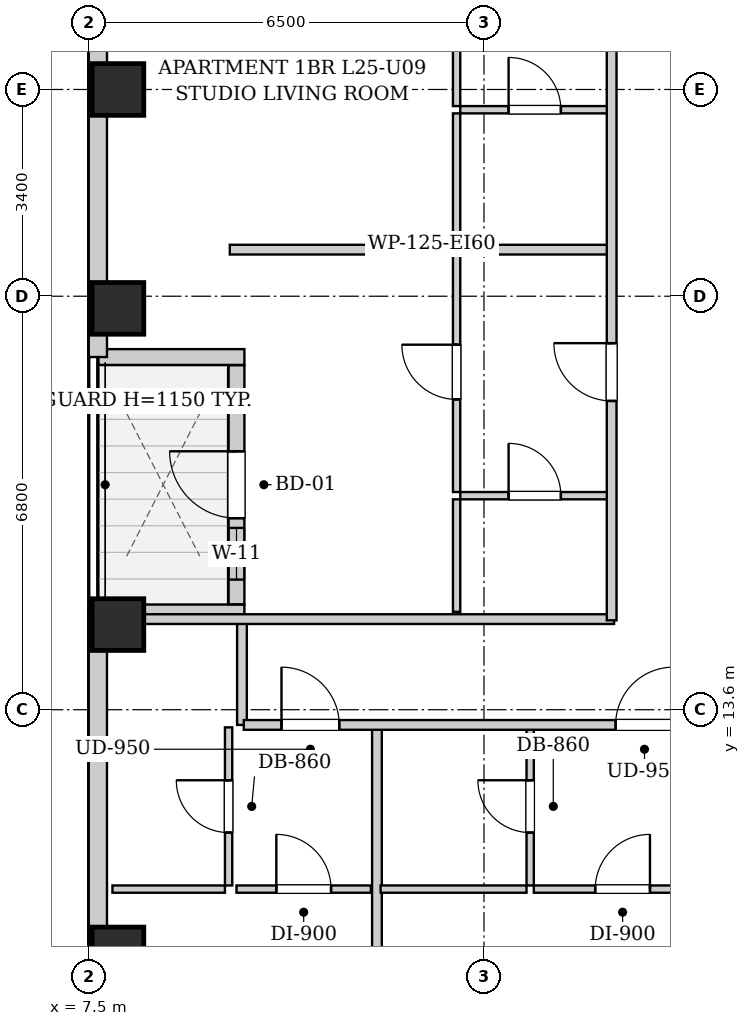
"""IFC4 building model, lengths in metres.
Left out: names, types, materials, properties, quantities, classifications, styles, units other than length and angle.
Written with IfcOpenShell. Run it as: python <this file> out.ifc"""

import sys

from ifc_helpers import new_model, si_unit, direction, frame, frame_2d, origin, origin_2d, place, context, subcontext, project, spatial, rectangle, extrude, element, fill, save


model = new_model("IFC4")
c1 = context("Model", 3, precision=1e-05, world=origin(), true_north=direction((0.0, 1.0)))
c2 = subcontext(c1, "Body", "Model", "MODEL_VIEW")
j1 = project(units=[si_unit("LENGTHUNIT", "METRE"), si_unit("PLANEANGLEUNIT", "RADIAN")], contexts=[c1])
p1 = place(None, origin())
s1 = spatial("IfcSite", under=j1, at=p1, CompositionType="ELEMENT")
p2 = place(p1, origin())
s2 = spatial("IfcBuilding", under=s1, at=p2, CompositionType="ELEMENT")
p3 = place(p2, frame((0.0, 0.0, 91.1)))
s3 = spatial("IfcBuildingStorey", under=s2, at=p3, CompositionType="ELEMENT", Elevation=91.1)
for number, where, z_axis, x_axis in (
    (1, (7.98, 9.6, 0.0), (0.0, 0.0, 1.0), (1.0, 0.0, 0.0)),
    (2, (7.98, 15.0, 0.0), (0.0, 0.0, 1.0), (1.0, 0.0, 0.0)),
    (3, (7.98, 20.2, 0.0), (0.0, 0.0, 1.0), (1.0, 0.0, 0.0)),
    (4, (7.98, 23.8, 0.0), (0.0, 0.0, 1.0), (1.0, 0.0, 0.0)),
):
    element("IfcColumn", number, at=place(p3, frame(where, z_axis=z_axis, x_axis=x_axis)), inside=s3, PredefinedType="COLUMN", context=c2, shape_type="SweptSolid", body=[
        extrude(rectangle(XDim=0.85, YDim=0.85, at=origin_2d()), origin(), (0.0, 0.0, 1.0), 3.2),
    ])
p4 = place(p3, frame((7.65, 2.5, 0.0), z_axis=(0.0, 0.0, 1.0), x_axis=(0.0, 1.0, 0.0)))
e5 = element("IfcWall", 5, at=p4, inside=s3, PredefinedType="SOLIDWALL", context=c2, shape_type="SweptSolid", body=[
    extrude(rectangle(XDim=12.7, YDim=0.3, at=frame_2d((6.35, 0.0))), origin(), (0.0, 0.0, 1.0), 2.94),
])
p5 = place(p4, frame((3.482, 0.0, 0.55)))
e6 = element("IfcOpeningElement", 6, at=p5, cuts=e5, PredefinedType="OPENING", context=c2, shape_type="SweptSolid", body=[
    extrude(rectangle(XDim=1.35, YDim=1.2, at=frame_2d((0.675, 0.6))), frame((0.0, 0.16, 0.0), z_axis=(0.0, -1.0, 0.0), x_axis=(1.0, 0.0, 0.0)), (0.0, 0.0, 1.0), 0.32),
])
p6 = place(p4, frame((1.135, 0.0, 0.55)))
e7 = element("IfcOpeningElement", 7, at=p6, cuts=e5, PredefinedType="OPENING", context=c2, shape_type="SweptSolid", body=[
    extrude(rectangle(XDim=1.35, YDim=1.2, at=frame_2d((0.675, 0.6))), frame((0.0, 0.16, 0.0), z_axis=(0.0, -1.0, 0.0), x_axis=(1.0, 0.0, 0.0)), (0.0, 0.0, 1.0), 0.32),
])
p7 = place(p3, frame((7.66, 15.2, 0.0), z_axis=(0.0, 0.0, 1.0), x_axis=(1.0, 0.0, 0.0)))
e8 = element("IfcWall", 8, at=p7, inside=s3, PredefinedType="SOLIDWALL", context=c2, shape_type="SweptSolid", body=[
    extrude(rectangle(XDim=2.4, YDim=0.26, at=frame_2d((1.2, 0.0))), origin(), (0.0, 0.0, 1.0), 2.94),
])
p8 = place(p3, frame((9.93, 15.334, 0.0), z_axis=(0.0, 0.0, 1.0), x_axis=(0.0, 1.0, 0.0)))
e9 = element("IfcWall", 9, at=p8, inside=s3, PredefinedType="SOLIDWALL", context=c2, shape_type="SweptSolid", body=[
    extrude(rectangle(XDim=3.932, YDim=0.26, at=frame_2d((1.966, 0.0))), origin(), (0.0, 0.0, 1.0), 2.94),
])
p9 = place(p8, frame((1.416, 0.0, 0.0)))
e10 = element("IfcOpeningElement", 10, at=p9, cuts=e9, PredefinedType="OPENING", context=c2, shape_type="SweptSolid", body=[
    extrude(rectangle(XDim=1.1, YDim=2.0, at=frame_2d((0.55, 1.0))), frame((0.0, 0.14, 0.0), z_axis=(0.0, -1.0, 0.0), x_axis=(1.0, 0.0, 0.0)), (0.0, 0.0, 1.0), 0.28),
])
p10 = place(p8, frame((0.406, 0.0, 0.55)))
e11 = element("IfcOpeningElement", 11, at=p10, cuts=e9, PredefinedType="OPENING", context=c2, shape_type="SweptSolid", body=[
    extrude(rectangle(XDim=0.85, YDim=1.2, at=frame_2d((0.425, 0.6))), frame((0.0, 0.14, 0.0), z_axis=(0.0, -1.0, 0.0), x_axis=(1.0, 0.0, 0.0)), (0.0, 0.0, 1.0), 0.28),
])
p11 = place(p3, frame((10.06, 19.4, 0.0), z_axis=(0.0, 0.0, 1.0), x_axis=(-1.0, 0.0, 0.0)))
e12 = element("IfcWall", 12, at=p11, inside=s3, PredefinedType="SOLIDWALL", context=c2, shape_type="SweptSolid", body=[
    extrude(rectangle(XDim=2.4, YDim=0.26, at=frame_2d((1.2, 0.0))), origin(), (0.0, 0.0, 1.0), 2.94),
])
p12 = place(p3, frame((7.65, 19.4, 0.0), z_axis=(0.0, 0.0, 1.0), x_axis=(0.0, 1.0, 0.0)))
e13 = element("IfcWall", 13, at=p12, inside=s3, PredefinedType="SOLIDWALL", context=c2, shape_type="SweptSolid", body=[
    extrude(rectangle(XDim=21.4, YDim=0.3, at=frame_2d((10.7, 0.0))), origin(), (0.0, 0.0, 1.0), 2.94),
])
p13 = place(p12, frame((16.957, 0.0, 0.55)))
e14 = element("IfcOpeningElement", 14, at=p13, cuts=e13, PredefinedType="OPENING", context=c2, shape_type="SweptSolid", body=[
    extrude(rectangle(XDim=1.35, YDim=1.2, at=frame_2d((0.675, 0.6))), frame((0.0, 0.16, 0.0), z_axis=(0.0, -1.0, 0.0), x_axis=(1.0, 0.0, 0.0)), (0.0, 0.0, 1.0), 0.32),
])
p14 = place(p12, frame((15.185, 0.0, 0.55)))
e15 = element("IfcOpeningElement", 15, at=p14, cuts=e13, PredefinedType="OPENING", context=c2, shape_type="SweptSolid", body=[
    extrude(rectangle(XDim=1.35, YDim=1.2, at=frame_2d((0.675, 0.6))), frame((0.0, 0.16, 0.0), z_axis=(0.0, -1.0, 0.0), x_axis=(1.0, 0.0, 0.0)), (0.0, 0.0, 1.0), 0.32),
])
p15 = place(p12, frame((5.1, 0.0, 0.55)))
e16 = element("IfcOpeningElement", 16, at=p15, cuts=e13, PredefinedType="OPENING", context=c2, shape_type="SweptSolid", body=[
    extrude(rectangle(XDim=1.35, YDim=1.2, at=frame_2d((0.675, 0.6))), frame((0.0, 0.16, 0.0), z_axis=(0.0, -1.0, 0.0), x_axis=(1.0, 0.0, 0.0)), (0.0, 0.0, 1.0), 0.32),
])
p16 = place(p12, frame((6.71, 0.0, 0.55)))
e17 = element("IfcOpeningElement", 17, at=p16, cuts=e13, PredefinedType="OPENING", context=c2, shape_type="SweptSolid", body=[
    extrude(rectangle(XDim=1.35, YDim=1.2, at=frame_2d((0.675, 0.6))), frame((0.0, 0.16, 0.0), z_axis=(0.0, -1.0, 0.0), x_axis=(1.0, 0.0, 0.0)), (0.0, 0.0, 1.0), 0.32),
])
p17 = place(p3, frame((10.02, 13.35, 0.0), z_axis=(0.0, 0.0, 1.0), x_axis=(0.0, 1.0, 0.0)))
e18 = element("IfcWall", 18, at=p17, inside=s3, PredefinedType="PARTITIONING", context=c2, shape_type="SweptSolid", body=[
    extrude(rectangle(XDim=1.74, YDim=0.16, at=frame_2d((0.87, 0.0))), origin(), (0.0, 0.0, 1.0), 2.94),
])
p18 = place(p3, frame((7.78, 15.09, 0.0), z_axis=(0.0, 0.0, 1.0), x_axis=(1.0, 0.0, 0.0)))
e19 = element("IfcWall", 19, at=p18, inside=s3, PredefinedType="PARTITIONING", context=c2, shape_type="SweptSolid", body=[
    extrude(rectangle(XDim=8.36, YDim=0.16, at=frame_2d((4.18, 0.0))), origin(), (0.0, 0.0, 1.0), 2.309),
])
p19 = place(p3, frame((9.8, 10.71, 0.0), z_axis=(0.0, 0.0, 1.0), x_axis=(0.0, 1.0, 0.0)))
e20 = element("IfcWall", 20, at=p19, inside=s3, PredefinedType="PARTITIONING", context=c2, shape_type="SweptSolid", body=[
    extrude(rectangle(XDim=2.6, YDim=0.12, at=frame_2d((1.3, 0.0))), origin(), (0.0, 0.0, 1.0), 2.94),
])
p20 = place(p19, frame((0.87, 0.0, 0.0)))
e21 = element("IfcOpeningElement", 21, at=p20, cuts=e20, PredefinedType="OPENING", context=c2, shape_type="SweptSolid", body=[
    extrude(rectangle(XDim=0.86, YDim=2.05, at=frame_2d((0.43, 1.025))), frame((0.0, 0.07, 0.0), z_axis=(0.0, -1.0, 0.0), x_axis=(1.0, 0.0, 0.0)), (0.0, 0.0, 1.0), 0.14),
])
p21 = place(p3, frame((7.89, 10.65, 0.0), z_axis=(0.0, 0.0, 1.0), x_axis=(1.0, 0.0, 0.0)))
e22 = element("IfcWall", 22, at=p21, inside=s3, PredefinedType="PARTITIONING", context=c2, shape_type="SweptSolid", body=[
    extrude(rectangle(XDim=1.85, YDim=0.12, at=frame_2d((0.925, 0.0))), origin(), (0.0, 0.0, 1.0), 2.94),
])
p22 = place(p3, frame((9.93, 10.65, 0.0), z_axis=(0.0, 0.0, 1.0), x_axis=(1.0, 0.0, 0.0)))
e23 = element("IfcWall", 23, at=p22, inside=s3, PredefinedType="PARTITIONING", context=c2, shape_type="SweptSolid", body=[
    extrude(rectangle(XDim=2.21, YDim=0.12, at=frame_2d((1.105, 0.0))), origin(), (0.0, 0.0, 1.0), 2.94),
])
p23 = place(p22, frame((0.655, 0.0, 0.0)))
e24 = element("IfcOpeningElement", 24, at=p23, cuts=e23, PredefinedType="OPENING", context=c2, shape_type="SweptSolid", body=[
    extrude(rectangle(XDim=0.9, YDim=2.05, at=frame_2d((0.45, 1.025))), frame((0.0, 0.07, 0.0), z_axis=(0.0, -1.0, 0.0), x_axis=(1.0, 0.0, 0.0)), (0.0, 0.0, 1.0), 0.14),
])
p24 = place(p3, frame((12.24, 2.26, 0.0), z_axis=(0.0, 0.0, 1.0), x_axis=(0.0, 1.0, 0.0)))
e25 = element("IfcWall", 25, at=p24, inside=s3, PredefinedType="PARTITIONING", context=c2, shape_type="SweptSolid", body=[
    extrude(rectangle(XDim=11.05, YDim=0.16, at=frame_2d((5.525, 0.0))), origin(), (0.0, 0.0, 1.0), 2.94),
])
p25 = place(p3, frame((14.76, 10.71, 0.0), z_axis=(0.0, 0.0, 1.0), x_axis=(0.0, 1.0, 0.0)))
e26 = element("IfcWall", 26, at=p25, inside=s3, PredefinedType="PARTITIONING", context=c2, shape_type="SweptSolid", body=[
    extrude(rectangle(XDim=2.6, YDim=0.12, at=frame_2d((1.3, 0.0))), origin(), (0.0, 0.0, 1.0), 2.94),
])
p26 = place(p25, frame((0.87, 0.0, 0.0)))
e27 = element("IfcOpeningElement", 27, at=p26, cuts=e26, PredefinedType="OPENING", context=c2, shape_type="SweptSolid", body=[
    extrude(rectangle(XDim=0.86, YDim=2.05, at=frame_2d((0.43, 1.025))), frame((0.0, 0.07, 0.0), z_axis=(0.0, -1.0, 0.0), x_axis=(1.0, 0.0, 0.0)), (0.0, 0.0, 1.0), 0.14),
])
p27 = place(p3, frame((12.3, 10.65, 0.0), z_axis=(0.0, 0.0, 1.0), x_axis=(1.0, 0.0, 0.0)))
e28 = element("IfcWall", 28, at=p27, inside=s3, PredefinedType="PARTITIONING", context=c2, shape_type="SweptSolid", body=[
    extrude(rectangle(XDim=2.4, YDim=0.12, at=frame_2d((1.2, 0.0))), origin(), (0.0, 0.0, 1.0), 2.94),
])
p28 = place(p3, frame((14.82, 10.65, 0.0), z_axis=(0.0, 0.0, 1.0), x_axis=(1.0, 0.0, 0.0)))
e29 = element("IfcWall", 29, at=p28, inside=s3, PredefinedType="PARTITIONING", context=c2, shape_type="SweptSolid", body=[
    extrude(rectangle(XDim=2.92, YDim=0.12, at=frame_2d((1.46, 0.0))), origin(), (0.0, 0.0, 1.0), 2.94),
])
p29 = place(p28, frame((1.01, 0.0, 0.0)))
e30 = element("IfcOpeningElement", 30, at=p29, cuts=e29, PredefinedType="OPENING", context=c2, shape_type="SweptSolid", body=[
    extrude(rectangle(XDim=0.9, YDim=2.05, at=frame_2d((0.45, 1.025))), frame((0.0, 0.07, 0.0), z_axis=(0.0, -1.0, 0.0), x_axis=(1.0, 0.0, 0.0)), (0.0, 0.0, 1.0), 0.14),
])
p30 = place(p3, frame((9.82, 21.166, 0.0), z_axis=(0.0, 0.0, 1.0), x_axis=(1.0, 0.0, 0.0)))
e31 = element("IfcWall", 31, at=p30, inside=s3, PredefinedType="PARTITIONING", context=c2, shape_type="SweptSolid", body=[
    extrude(rectangle(XDim=6.24, YDim=0.16, at=frame_2d((3.12, 0.0))), origin(), (0.0, 0.0, 1.0), 2.94),
])
p31 = place(p3, frame((13.61, 17.12, 0.0), z_axis=(0.0, 0.0, 1.0), x_axis=(1.0, 0.0, 0.0)))
e32 = element("IfcWall", 32, at=p31, inside=s3, PredefinedType="PARTITIONING", context=c2, shape_type="SweptSolid", body=[
    extrude(rectangle(XDim=2.45, YDim=0.12, at=frame_2d((1.225, 0.0))), origin(), (0.0, 0.0, 1.0), 2.94),
])
p32 = place(p31, frame((0.795, 0.0, 0.0)))
e33 = element("IfcOpeningElement", 33, at=p32, cuts=e32, PredefinedType="OPENING", context=c2, shape_type="SweptSolid", body=[
    extrude(rectangle(XDim=0.86, YDim=2.05, at=frame_2d((0.43, 1.025))), frame((0.0, 0.07, 0.0), z_axis=(0.0, -1.0, 0.0), x_axis=(1.0, 0.0, 0.0)), (0.0, 0.0, 1.0), 0.14),
])
p33 = place(p3, frame((13.55, 15.21, 0.0), z_axis=(0.0, 0.0, 1.0), x_axis=(0.0, 1.0, 0.0)))
e34 = element("IfcWall", 34, at=p33, inside=s3, PredefinedType="PARTITIONING", context=c2, shape_type="SweptSolid", body=[
    extrude(rectangle(XDim=1.85, YDim=0.12, at=frame_2d((0.925, 0.0))), origin(), (0.0, 0.0, 1.0), 2.94),
])
p34 = place(p3, frame((13.55, 17.18, 0.0), z_axis=(0.0, 0.0, 1.0), x_axis=(0.0, 1.0, 0.0)))
e35 = element("IfcWall", 35, at=p34, inside=s3, PredefinedType="PARTITIONING", context=c2, shape_type="SweptSolid", body=[
    extrude(rectangle(XDim=3.946, YDim=0.12, at=frame_2d((1.973, 0.0))), origin(), (0.0, 0.0, 1.0), 2.94),
])
p35 = place(p34, frame((1.523, 0.0, 0.0)))
e36 = element("IfcOpeningElement", 36, at=p35, cuts=e35, PredefinedType="OPENING", context=c2, shape_type="SweptSolid", body=[
    extrude(rectangle(XDim=0.9, YDim=2.05, at=frame_2d((0.45, 1.025))), frame((0.0, 0.07, 0.0), z_axis=(0.0, -1.0, 0.0), x_axis=(1.0, 0.0, 0.0)), (0.0, 0.0, 1.0), 0.14),
])
p36 = place(p3, frame((13.61, 23.467, 0.0), z_axis=(0.0, 0.0, 1.0), x_axis=(1.0, 0.0, 0.0)))
e37 = element("IfcWall", 37, at=p36, inside=s3, PredefinedType="PARTITIONING", context=c2, shape_type="SweptSolid", body=[
    extrude(rectangle(XDim=2.45, YDim=0.12, at=frame_2d((1.225, 0.0))), origin(), (0.0, 0.0, 1.0), 2.94),
])
p37 = place(p36, frame((0.795, 0.0, 0.0)))
e38 = element("IfcOpeningElement", 38, at=p37, cuts=e37, PredefinedType="OPENING", context=c2, shape_type="SweptSolid", body=[
    extrude(rectangle(XDim=0.86, YDim=2.05, at=frame_2d((0.43, 1.025))), frame((0.0, 0.07, 0.0), z_axis=(0.0, -1.0, 0.0), x_axis=(1.0, 0.0, 0.0)), (0.0, 0.0, 1.0), 0.14),
])
p38 = place(p3, frame((13.55, 21.286, 0.0), z_axis=(0.0, 0.0, 1.0), x_axis=(0.0, 1.0, 0.0)))
e39 = element("IfcWall", 39, at=p38, inside=s3, PredefinedType="PARTITIONING", context=c2, shape_type="SweptSolid", body=[
    extrude(rectangle(XDim=2.121, YDim=0.12, at=frame_2d((1.061, 0.0))), origin(), (0.0, 0.0, 1.0), 2.94),
])
p39 = place(p3, frame((13.55, 23.527, 0.0), z_axis=(0.0, 0.0, 1.0), x_axis=(0.0, 1.0, 0.0)))
e40 = element("IfcWall", 40, at=p39, inside=s3, PredefinedType="PARTITIONING", context=c2, shape_type="SweptSolid", body=[
    extrude(rectangle(XDim=5.333, YDim=0.12, at=frame_2d((2.667, 0.0))), origin(), (0.0, 0.0, 1.0), 2.94),
])
p40 = place(p39, frame((2.216, 0.0, 0.0)))
e41 = element("IfcOpeningElement", 41, at=p40, cuts=e40, PredefinedType="OPENING", context=c2, shape_type="SweptSolid", body=[
    extrude(rectangle(XDim=0.9, YDim=2.05, at=frame_2d((0.45, 1.025))), frame((0.0, 0.07, 0.0), z_axis=(0.0, -1.0, 0.0), x_axis=(1.0, 0.0, 0.0)), (0.0, 0.0, 1.0), 0.14),
])
p41 = place(p3, frame((10.05, 13.35, 0.0), z_axis=(0.0, 0.0, 1.0), x_axis=(1.0, 0.0, 0.0)))
e42 = element("IfcWall", 42, at=p41, inside=s3, PredefinedType="PARTITIONING", context=c2, shape_type="SweptSolid", body=[
    extrude(rectangle(XDim=30.8, YDim=0.16, at=frame_2d((15.4, 0.0))), origin(), (0.0, 0.0, 1.0), 2.94),
])
p42 = place(p41, frame((0.62, 0.0, 0.0)))
e43 = element("IfcOpeningElement", 43, at=p42, cuts=e42, PredefinedType="OPENING", context=c2, shape_type="SweptSolid", body=[
    extrude(rectangle(XDim=0.95, YDim=2.1, at=frame_2d((0.475, 1.05))), frame((0.0, 0.09, 0.0), z_axis=(0.0, -1.0, 0.0), x_axis=(1.0, 0.0, 0.0)), (0.0, 0.0, 1.0), 0.18),
])
p43 = place(p41, frame((6.115, 0.0, 0.0)))
e44 = element("IfcOpeningElement", 44, at=p43, cuts=e42, PredefinedType="OPENING", context=c2, shape_type="SweptSolid", body=[
    extrude(rectangle(XDim=0.95, YDim=2.1, at=frame_2d((0.475, 1.05))), frame((0.0, 0.09, 0.0), z_axis=(0.0, -1.0, 0.0), x_axis=(1.0, 0.0, 0.0)), (0.0, 0.0, 1.0), 0.18),
])
p44 = place(p41, frame((17.056, 0.0, 0.0)))
e45 = element("IfcOpeningElement", 45, at=p44, cuts=e42, PredefinedType="OPENING", context=c2, shape_type="SweptSolid", body=[
    extrude(rectangle(XDim=0.95, YDim=2.1, at=frame_2d((0.475, 1.05))), frame((0.0, 0.09, 0.0), z_axis=(0.0, -1.0, 0.0), x_axis=(1.0, 0.0, 0.0)), (0.0, 0.0, 1.0), 0.18),
])
p45 = place(p41, frame((24.025, 0.0, 0.0)))
e46 = element("IfcOpeningElement", 46, at=p45, cuts=e42, PredefinedType="OPENING", context=c2, shape_type="SweptSolid", body=[
    extrude(rectangle(XDim=0.95, YDim=2.1, at=frame_2d((0.475, 1.05))), frame((0.0, 0.09, 0.0), z_axis=(0.0, -1.0, 0.0), x_axis=(1.0, 0.0, 0.0)), (0.0, 0.0, 1.0), 0.18),
])
p46 = place(p3, frame((16.1, 15.07, 0.0), z_axis=(0.0, 0.0, 1.0), x_axis=(0.0, 1.0, 0.0)))
e47 = element("IfcWall", 47, at=p46, inside=s3, PredefinedType="PARTITIONING", context=c2, shape_type="SweptSolid", body=[
    extrude(rectangle(XDim=13.93, YDim=0.16, at=frame_2d((6.965, 0.0))), origin(), (0.0, 0.0, 1.0), 2.94),
])
p47 = place(p46, frame((3.608, 0.0, 0.0)))
e48 = element("IfcOpeningElement", 48, at=p47, cuts=e47, PredefinedType="OPENING", context=c2, shape_type="SweptSolid", body=[
    extrude(rectangle(XDim=0.95, YDim=2.1, at=frame_2d((0.475, 1.05))), frame((0.0, 0.09, 0.0), z_axis=(0.0, -1.0, 0.0), x_axis=(1.0, 0.0, 0.0)), (0.0, 0.0, 1.0), 0.18),
])
p48 = place(p46, frame((10.649, 0.0, 0.0)))
e49 = element("IfcOpeningElement", 49, at=p48, cuts=e47, PredefinedType="OPENING", context=c2, shape_type="SweptSolid", body=[
    extrude(rectangle(XDim=0.95, YDim=2.1, at=frame_2d((0.475, 1.05))), frame((0.0, 0.09, 0.0), z_axis=(0.0, -1.0, 0.0), x_axis=(1.0, 0.0, 0.0)), (0.0, 0.0, 1.0), 0.18),
])
p49 = place(p20, origin())
e50 = element("IfcDoor", 50, at=p49, inside=s3, OperationType="SINGLE_SWING_RIGHT", PredefinedType="DOOR", context=c2, shape_type="SweptSolid", body=[
    extrude(rectangle(XDim=0.86, YDim=2.05, at=frame_2d((0.43, 1.025))), frame((0.0, 0.025, 0.0), z_axis=(0.0, -1.0, 0.0), x_axis=(1.0, 0.0, 0.0)), (0.0, 0.0, 1.0), 0.05),
])
fill(e21, e50)
p50 = place(p23, origin())
e51 = element("IfcDoor", 51, at=p50, inside=s3, OperationType="SINGLE_SWING_LEFT", PredefinedType="DOOR", context=c2, shape_type="SweptSolid", body=[
    extrude(rectangle(XDim=0.9, YDim=2.05, at=frame_2d((0.45, 1.025))), frame((0.0, 0.025, 0.0), z_axis=(0.0, -1.0, 0.0), x_axis=(1.0, 0.0, 0.0)), (0.0, 0.0, 1.0), 0.05),
])
fill(e24, e51)
p51 = place(p26, origin())
e52 = element("IfcDoor", 52, at=p51, inside=s3, OperationType="SINGLE_SWING_RIGHT", PredefinedType="DOOR", context=c2, shape_type="SweptSolid", body=[
    extrude(rectangle(XDim=0.86, YDim=2.05, at=frame_2d((0.43, 1.025))), frame((0.0, 0.025, 0.0), z_axis=(0.0, -1.0, 0.0), x_axis=(1.0, 0.0, 0.0)), (0.0, 0.0, 1.0), 0.05),
])
fill(e27, e52)
p52 = place(p29, origin())
e53 = element("IfcDoor", 53, at=p52, inside=s3, OperationType="SINGLE_SWING_RIGHT", PredefinedType="DOOR", context=c2, shape_type="SweptSolid", body=[
    extrude(rectangle(XDim=0.9, YDim=2.05, at=frame_2d((0.45, 1.025))), frame((0.0, 0.025, 0.0), z_axis=(0.0, -1.0, 0.0), x_axis=(1.0, 0.0, 0.0)), (0.0, 0.0, 1.0), 0.05),
])
fill(e30, e53)
p53 = place(p32, origin())
e54 = element("IfcDoor", 54, at=p53, inside=s3, OperationType="SINGLE_SWING_LEFT", PredefinedType="DOOR", context=c2, shape_type="SweptSolid", body=[
    extrude(rectangle(XDim=0.86, YDim=2.05, at=frame_2d((0.43, 1.025))), frame((0.0, 0.025, 0.0), z_axis=(0.0, -1.0, 0.0), x_axis=(1.0, 0.0, 0.0)), (0.0, 0.0, 1.0), 0.05),
])
fill(e33, e54)
p54 = place(p35, origin())
e55 = element("IfcDoor", 55, at=p54, inside=s3, OperationType="SINGLE_SWING_RIGHT", PredefinedType="DOOR", context=c2, shape_type="SweptSolid", body=[
    extrude(rectangle(XDim=0.9, YDim=2.05, at=frame_2d((0.45, 1.025))), frame((0.0, 0.025, 0.0), z_axis=(0.0, -1.0, 0.0), x_axis=(1.0, 0.0, 0.0)), (0.0, 0.0, 1.0), 0.05),
])
fill(e36, e55)
p55 = place(p37, origin())
e56 = element("IfcDoor", 56, at=p55, inside=s3, OperationType="SINGLE_SWING_LEFT", PredefinedType="DOOR", context=c2, shape_type="SweptSolid", body=[
    extrude(rectangle(XDim=0.86, YDim=2.05, at=frame_2d((0.43, 1.025))), frame((0.0, 0.025, 0.0), z_axis=(0.0, -1.0, 0.0), x_axis=(1.0, 0.0, 0.0)), (0.0, 0.0, 1.0), 0.05),
])
fill(e38, e56)
p56 = place(p42, origin())
e57 = element("IfcDoor", 57, at=p56, inside=s3, OperationType="SINGLE_SWING_LEFT", PredefinedType="DOOR", context=c2, shape_type="SweptSolid", body=[
    extrude(rectangle(XDim=0.95, YDim=2.1, at=frame_2d((0.475, 1.05))), frame((0.0, 0.025, 0.0), z_axis=(0.0, -1.0, 0.0), x_axis=(1.0, 0.0, 0.0)), (0.0, 0.0, 1.0), 0.05),
])
fill(e43, e57)
p57 = place(p43, origin())
e58 = element("IfcDoor", 58, at=p57, inside=s3, OperationType="SINGLE_SWING_RIGHT", PredefinedType="DOOR", context=c2, shape_type="SweptSolid", body=[
    extrude(rectangle(XDim=0.95, YDim=2.1, at=frame_2d((0.475, 1.05))), frame((0.0, 0.025, 0.0), z_axis=(0.0, -1.0, 0.0), x_axis=(1.0, 0.0, 0.0)), (0.0, 0.0, 1.0), 0.05),
])
fill(e44, e58)
p58 = place(p47, origin())
e59 = element("IfcDoor", 59, at=p58, inside=s3, OperationType="SINGLE_SWING_RIGHT", PredefinedType="DOOR", context=c2, shape_type="SweptSolid", body=[
    extrude(rectangle(XDim=0.95, YDim=2.1, at=frame_2d((0.475, 1.05))), frame((0.0, 0.025, 0.0), z_axis=(0.0, -1.0, 0.0), x_axis=(1.0, 0.0, 0.0)), (0.0, 0.0, 1.0), 0.05),
])
fill(e48, e59)
p59 = place(p9, origin())
e60 = element("IfcDoor", 60, at=p59, inside=s3, OperationType="SINGLE_SWING_RIGHT", PredefinedType="DOOR", context=c2, shape_type="SweptSolid", body=[
    extrude(rectangle(XDim=1.1, YDim=2.0, at=frame_2d((0.55, 1.0))), frame((0.0, 0.025, 0.0), z_axis=(0.0, -1.0, 0.0), x_axis=(1.0, 0.0, 0.0)), (0.0, 0.0, 1.0), 0.05),
])
fill(e10, e60)
p60 = place(p10, origin())
e61 = element("IfcWindow", 61, at=p60, inside=s3, PartitioningType="SINGLE_PANEL", PredefinedType="WINDOW", context=c2, shape_type="SweptSolid", body=[
    extrude(rectangle(XDim=0.85, YDim=1.2, at=frame_2d((0.425, 0.6))), frame((0.0, 0.03, 0.0), z_axis=(0.0, -1.0, 0.0), x_axis=(1.0, 0.0, 0.0)), (0.0, 0.0, 1.0), 0.06),
])
fill(e11, e61)
save(model, sys.argv[1])
